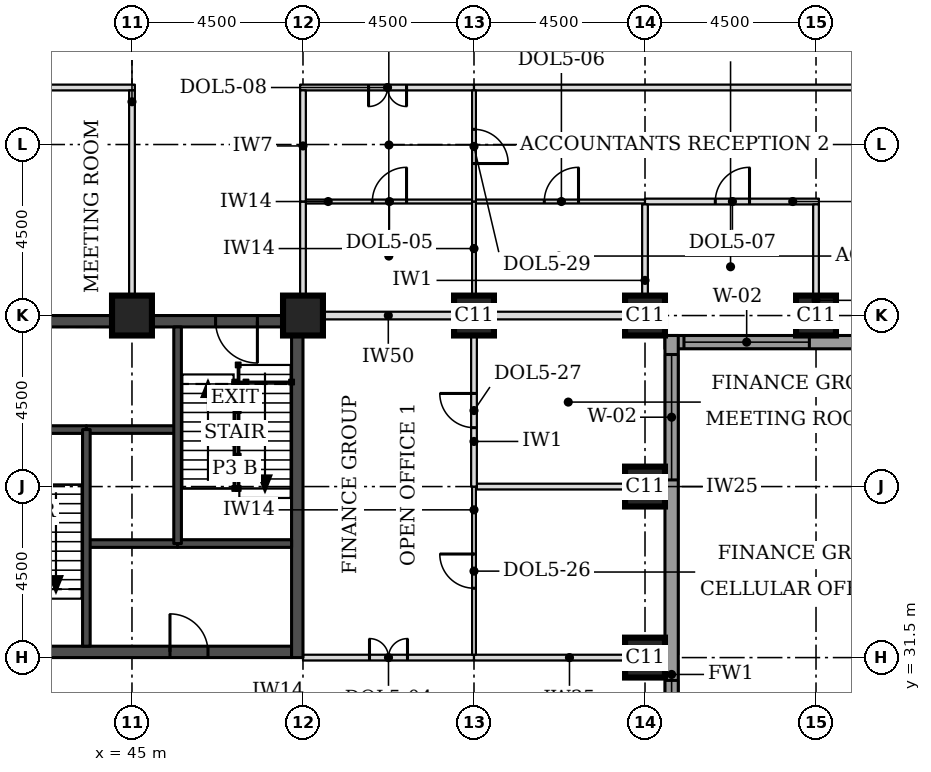
"""IFC4 building model, lengths in metres.
Left out: names, types, materials, properties, quantities, classifications, styles, units other than length and angle.
Written with IfcOpenShell. Run it as: python <this file> out.ifc"""

import sys

from ifc_helpers import new_model, si_unit, direction, frame, frame_2d, origin, origin_2d, place, context, subcontext, project, spatial, rectangle, extrude, element, fill, save


model = new_model("IFC4")
c1 = context("Model", 3, precision=1e-05, world=origin(), true_north=direction((0.0, 1.0)))
c2 = subcontext(c1, "Body", "Model", "MODEL_VIEW")
j1 = project(units=[si_unit("LENGTHUNIT", "METRE"), si_unit("PLANEANGLEUNIT", "RADIAN")], contexts=[c1])
p1 = place(None, origin())
s1 = spatial("IfcSite", under=j1, at=p1, CompositionType="ELEMENT")
p2 = place(p1, origin())
s2 = spatial("IfcBuilding", under=s1, at=p2, CompositionType="ELEMENT")
p3 = place(p2, frame((0.0, 0.0, 112.2)))
s3 = spatial("IfcBuildingStorey", under=s2, at=p3, CompositionType="ELEMENT", Elevation=112.2)
for number, where, z_axis, x_axis in (
    (1, (58.5, 31.5, 0.0), (0.0, 0.0, 1.0), (1.0, 0.0, 0.0)),
    (2, (58.5, 36.0, 0.0), (0.0, 0.0, 1.0), (1.0, 0.0, 0.0)),
    (3, (45.0, 40.5, 0.0), (0.0, 0.0, 1.0), (1.0, 0.0, 0.0)),
    (4, (49.5, 40.5, 0.0), (0.0, 0.0, 1.0), (1.0, 0.0, 0.0)),
    (5, (54.0, 40.5, 0.0), (0.0, 0.0, 1.0), (1.0, 0.0, 0.0)),
    (6, (58.5, 40.5, 0.0), (0.0, 0.0, 1.0), (1.0, 0.0, 0.0)),
    (7, (63.0, 40.5, 0.0), (0.0, 0.0, 1.0), (1.0, 0.0, 0.0)),
):
    element("IfcColumn", number, at=place(p3, frame(where, z_axis=z_axis, x_axis=x_axis)), inside=s3, PredefinedType="COLUMN", context=c2, shape_type="SweptSolid", body=[
        extrude(rectangle(XDim=1.05, YDim=1.05, at=origin_2d()), origin(), (0.0, 0.0, 1.0), 3.7),
    ])
p4 = place(p3, frame((40.8, 31.65, 0.0), z_axis=(0.0, 0.0, 1.0), x_axis=(1.0, 0.0, 0.0)))
e8 = element("IfcWall", 8, at=p4, inside=s3, PredefinedType="SHEAR", context=c2, shape_type="SweptSolid", body=[
    extrude(rectangle(XDim=8.4, YDim=0.3, at=frame_2d((4.2, 0.0))), origin(), (0.0, 0.0, 1.0), 3.7),
])
p5 = place(p4, frame((5.2, 0.0, 0.0)))
e9 = element("IfcOpeningElement", 9, at=p5, cuts=e8, PredefinedType="OPENING", context=c2, shape_type="SweptSolid", body=[
    extrude(rectangle(XDim=1.0, YDim=2.1, at=frame_2d((0.5, 1.05))), frame((0.0, 0.16, 0.0), z_axis=(0.0, -1.0, 0.0), x_axis=(1.0, 0.0, 0.0)), (0.0, 0.0, 1.0), 0.32),
])
p6 = place(p3, frame((40.8, 40.35, 0.0), z_axis=(0.0, 0.0, 1.0), x_axis=(1.0, 0.0, 0.0)))
e10 = element("IfcWall", 10, at=p6, inside=s3, PredefinedType="SHEAR", context=c2, shape_type="SweptSolid", body=[
    extrude(rectangle(XDim=8.4, YDim=0.3, at=frame_2d((4.2, 0.0))), origin(), (0.0, 0.0, 1.0), 3.7),
])
p7 = place(p6, frame((6.4, 0.0, 0.0)))
e11 = element("IfcOpeningElement", 11, at=p7, cuts=e10, PredefinedType="OPENING", context=c2, shape_type="SweptSolid", body=[
    extrude(rectangle(XDim=1.1, YDim=2.1, at=frame_2d((0.55, 1.05))), frame((0.0, 0.16, 0.0), z_axis=(0.0, -1.0, 0.0), x_axis=(1.0, 0.0, 0.0)), (0.0, 0.0, 1.0), 0.32),
])
p8 = place(p3, frame((49.35, 31.5, 0.0), z_axis=(0.0, 0.0, 1.0), x_axis=(0.0, 1.0, 0.0)))
e12 = element("IfcWall", 12, at=p8, inside=s3, PredefinedType="SHEAR", context=c2, shape_type="SweptSolid", body=[
    extrude(rectangle(XDim=9.0, YDim=0.3, at=frame_2d((4.5, 0.0))), origin(), (0.0, 0.0, 1.0), 3.7),
])
p9 = place(p3, frame((59.025, 39.8, 0.0), z_axis=(0.0, 0.0, 1.0), x_axis=(1.0, 0.0, 0.0)))
e13 = element("IfcWall", 13, at=p9, inside=s3, PredefinedType="STANDARD", context=c2, shape_type="SweptSolid", body=[
    extrude(rectangle(XDim=13.337, YDim=0.35, at=frame_2d((6.669, 0.0))), origin(), (0.0, 0.0, 1.0), 3.525),
])
p10 = place(p9, frame((0.5, 0.0, 0.9)))
e14 = element("IfcOpeningElement", 14, at=p10, cuts=e13, PredefinedType="OPENING", context=c2, shape_type="SweptSolid", body=[
    extrude(rectangle(XDim=3.3, YDim=1.9, at=frame_2d((1.65, 0.95))), frame((0.0, 0.185, 0.0), z_axis=(0.0, -1.0, 0.0), x_axis=(1.0, 0.0, 0.0)), (0.0, 0.0, 1.0), 0.37),
])
p11 = place(p3, frame((59.2, 22.138, 0.0), z_axis=(0.0, 0.0, 1.0), x_axis=(0.0, 1.0, 0.0)))
e15 = element("IfcWall", 15, at=p11, inside=s3, PredefinedType="STANDARD", context=c2, shape_type="SweptSolid", body=[
    extrude(rectangle(XDim=17.837, YDim=0.35, at=frame_2d((8.919, 0.0))), origin(), (0.0, 0.0, 1.0), 3.525),
])
p12 = place(p11, frame((5.462, 0.0, 0.9)))
e16 = element("IfcOpeningElement", 16, at=p12, cuts=e15, PredefinedType="OPENING", context=c2, shape_type="SweptSolid", body=[
    extrude(rectangle(XDim=3.3, YDim=1.9, at=frame_2d((1.65, 0.95))), frame((0.0, 0.185, 0.0), z_axis=(0.0, -1.0, 0.0), x_axis=(1.0, 0.0, 0.0)), (0.0, 0.0, 1.0), 0.37),
])
p13 = place(p11, frame((14.037, 0.0, 0.9)))
e17 = element("IfcOpeningElement", 17, at=p13, cuts=e15, PredefinedType="OPENING", context=c2, shape_type="SweptSolid", body=[
    extrude(rectangle(XDim=3.3, YDim=1.9, at=frame_2d((1.65, 0.95))), frame((0.0, 0.185, 0.0), z_axis=(0.0, -1.0, 0.0), x_axis=(1.0, 0.0, 0.0)), (0.0, 0.0, 1.0), 0.37),
])
p14 = place(p3, frame((49.5, 31.5, 0.0), z_axis=(0.0, 0.0, 1.0), x_axis=(1.0, 0.0, 0.0)))
e18 = element("IfcWall", 18, at=p14, inside=s3, PredefinedType="PARTITIONING", context=c2, shape_type="SweptSolid", body=[
    extrude(rectangle(XDim=4.5, YDim=0.15, at=frame_2d((2.25, 0.0))), origin(), (0.0, 0.0, 1.0), 2.55),
])
p15 = place(p14, frame((1.75, 0.0, 0.0)))
e19 = element("IfcOpeningElement", 19, at=p15, cuts=e18, PredefinedType="OPENING", context=c2, shape_type="SweptSolid", body=[
    extrude(rectangle(XDim=1.0, YDim=2.1, at=frame_2d((0.5, 1.05))), frame((0.0, 0.085, 0.0), z_axis=(0.0, -1.0, 0.0), x_axis=(1.0, 0.0, 0.0)), (0.0, 0.0, 1.0), 0.17),
])
p16 = place(p3, frame((54.0, 31.5, 0.0), z_axis=(0.0, 0.0, 1.0), x_axis=(1.0, 0.0, 0.0)))
e20 = element("IfcWall", 20, at=p16, inside=s3, PredefinedType="PARTITIONING", context=c2, shape_type="SweptSolid", body=[
    extrude(rectangle(XDim=5.025, YDim=0.15, at=frame_2d((2.512, 0.0))), origin(), (0.0, 0.0, 1.0), 2.55),
])
p17 = place(p3, frame((54.075, 36.0, 0.0), z_axis=(0.0, 0.0, 1.0), x_axis=(1.0, 0.0, 0.0)))
e21 = element("IfcWall", 21, at=p17, inside=s3, PredefinedType="PARTITIONING", context=c2, shape_type="SweptSolid", body=[
    extrude(rectangle(XDim=4.95, YDim=0.15, at=frame_2d((2.475, 0.0))), origin(), (0.0, 0.0, 1.0), 3.096),
])
p18 = place(p3, frame((50.015, 40.5, 0.0), z_axis=(0.0, 0.0, 1.0), x_axis=(1.0, 0.0, 0.0)))
e22 = element("IfcWall", 22, at=p18, inside=s3, PredefinedType="PARTITIONING", context=c2, shape_type="SweptSolid", body=[
    extrude(rectangle(XDim=3.46, YDim=0.2, at=frame_2d((1.73, 0.0))), origin(), (0.0, 0.0, 1.0), 2.8),
])
p19 = place(p3, frame((54.495, 40.5, 0.0), z_axis=(0.0, 0.0, 1.0), x_axis=(1.0, 0.0, 0.0)))
e23 = element("IfcWall", 23, at=p19, inside=s3, PredefinedType="PARTITIONING", context=c2, shape_type="SweptSolid", body=[
    extrude(rectangle(XDim=3.48, YDim=0.2, at=frame_2d((1.74, 0.0))), origin(), (0.0, 0.0, 1.0), 2.8),
])
p20 = place(p3, frame((49.575, 43.5, 0.0), z_axis=(0.0, 0.0, 1.0), x_axis=(1.0, 0.0, 0.0)))
e24 = element("IfcWall", 24, at=p20, inside=s3, PredefinedType="PARTITIONING", context=c2, shape_type="SweptSolid", body=[
    extrude(rectangle(XDim=4.375, YDim=0.1, at=frame_2d((2.188, 0.0))), origin(), (0.0, 0.0, 1.0), 3.55),
])
p21 = place(p20, frame((1.75, 0.0, 0.0)))
e25 = element("IfcOpeningElement", 25, at=p21, cuts=e24, PredefinedType="OPENING", context=c2, shape_type="SweptSolid", body=[
    extrude(rectangle(XDim=0.9, YDim=2.1, at=frame_2d((0.45, 1.05))), frame((0.0, 0.06, 0.0), z_axis=(0.0, -1.0, 0.0), x_axis=(1.0, 0.0, 0.0)), (0.0, 0.0, 1.0), 0.12),
])
p22 = place(p3, frame((54.05, 43.5, 0.0), z_axis=(0.0, 0.0, 1.0), x_axis=(1.0, 0.0, 0.0)))
e26 = element("IfcWall", 26, at=p22, inside=s3, PredefinedType="PARTITIONING", context=c2, shape_type="SweptSolid", body=[
    extrude(rectangle(XDim=4.45, YDim=0.1, at=frame_2d((2.225, 0.0))), origin(), (0.0, 0.0, 1.0), 3.55),
])
p23 = place(p22, frame((1.8, 0.0, 0.0)))
e27 = element("IfcOpeningElement", 27, at=p23, cuts=e26, PredefinedType="OPENING", context=c2, shape_type="SweptSolid", body=[
    extrude(rectangle(XDim=0.9, YDim=2.1, at=frame_2d((0.45, 1.05))), frame((0.0, 0.06, 0.0), z_axis=(0.0, -1.0, 0.0), x_axis=(1.0, 0.0, 0.0)), (0.0, 0.0, 1.0), 0.12),
])
p24 = place(p3, frame((58.5, 43.5, 0.0), z_axis=(0.0, 0.0, 1.0), x_axis=(1.0, 0.0, 0.0)))
e28 = element("IfcWall", 28, at=p24, inside=s3, PredefinedType="PARTITIONING", context=c2, shape_type="SweptSolid", body=[
    extrude(rectangle(XDim=4.575, YDim=0.15, at=frame_2d((2.288, 0.0))), origin(), (0.0, 0.0, 1.0), 3.55),
])
p25 = place(p24, frame((1.85, 0.0, 0.0)))
e29 = element("IfcOpeningElement", 29, at=p25, cuts=e28, PredefinedType="OPENING", context=c2, shape_type="SweptSolid", body=[
    extrude(rectangle(XDim=0.9, YDim=2.1, at=frame_2d((0.45, 1.05))), frame((0.0, 0.085, 0.0), z_axis=(0.0, -1.0, 0.0), x_axis=(1.0, 0.0, 0.0)), (0.0, 0.0, 1.0), 0.17),
])
p26 = place(p3, frame((40.425, 46.5, 0.0), z_axis=(0.0, 0.0, 1.0), x_axis=(1.0, 0.0, 0.0)))
e30 = element("IfcWall", 30, at=p26, inside=s3, PredefinedType="PARTITIONING", context=c2, shape_type="SweptSolid", body=[
    extrude(rectangle(XDim=4.65, YDim=0.15, at=frame_2d((2.325, 0.0))), origin(), (0.0, 0.0, 1.0), 3.55),
])
p27 = place(p3, frame((49.425, 46.5, 0.0), z_axis=(0.0, 0.0, 1.0), x_axis=(1.0, 0.0, 0.0)))
e31 = element("IfcWall", 31, at=p27, inside=s3, PredefinedType="PARTITIONING", context=c2, shape_type="SweptSolid", body=[
    extrude(rectangle(XDim=4.575, YDim=0.15, at=frame_2d((2.288, 0.0))), origin(), (0.0, 0.0, 1.0), 3.55),
])
p28 = place(p27, frame((1.8, 0.0, 0.0)))
e32 = element("IfcOpeningElement", 32, at=p28, cuts=e31, PredefinedType="OPENING", context=c2, shape_type="SweptSolid", body=[
    extrude(rectangle(XDim=1.0, YDim=2.1, at=frame_2d((0.5, 1.05))), frame((0.0, 0.085, 0.0), z_axis=(0.0, -1.0, 0.0), x_axis=(1.0, 0.0, 0.0)), (0.0, 0.0, 1.0), 0.17),
])
p29 = place(p3, frame((54.0, 46.5, 0.0), z_axis=(0.0, 0.0, 1.0), x_axis=(1.0, 0.0, 0.0)))
e33 = element("IfcWall", 33, at=p29, inside=s3, PredefinedType="PARTITIONING", context=c2, shape_type="SweptSolid", body=[
    extrude(rectangle(XDim=16.5, YDim=0.15, at=frame_2d((8.25, 0.0))), origin(), (0.0, 0.0, 1.0), 3.55),
])
p30 = place(p3, frame((54.0, 31.575, 0.0), z_axis=(0.0, 0.0, 1.0), x_axis=(0.0, 1.0, 0.0)))
e34 = element("IfcWall", 34, at=p30, inside=s3, PredefinedType="PARTITIONING", context=c2, shape_type="SweptSolid", body=[
    extrude(rectangle(XDim=4.425, YDim=0.1, at=frame_2d((2.212, 0.0))), origin(), (0.0, 0.0, 1.0), 3.55),
])
p31 = place(p30, frame((1.75, 0.0, 0.0)))
e35 = element("IfcOpeningElement", 35, at=p31, cuts=e34, PredefinedType="OPENING", context=c2, shape_type="SweptSolid", body=[
    extrude(rectangle(XDim=0.9, YDim=2.1, at=frame_2d((0.45, 1.05))), frame((0.0, 0.06, 0.0), z_axis=(0.0, -1.0, 0.0), x_axis=(1.0, 0.0, 0.0)), (0.0, 0.0, 1.0), 0.12),
])
p32 = place(p3, frame((54.0, 36.0, 0.0), z_axis=(0.0, 0.0, 1.0), x_axis=(0.0, 1.0, 0.0)))
e36 = element("IfcWall", 36, at=p32, inside=s3, PredefinedType="PARTITIONING", context=c2, shape_type="SweptSolid", body=[
    extrude(rectangle(XDim=3.975, YDim=0.15, at=frame_2d((1.988, 0.0))), origin(), (0.0, 0.0, 1.0), 3.55),
])
p33 = place(p32, frame((1.55, 0.0, 0.0)))
e37 = element("IfcOpeningElement", 37, at=p33, cuts=e36, PredefinedType="OPENING", context=c2, shape_type="SweptSolid", body=[
    extrude(rectangle(XDim=0.9, YDim=2.1, at=frame_2d((0.45, 1.05))), frame((0.0, 0.085, 0.0), z_axis=(0.0, -1.0, 0.0), x_axis=(1.0, 0.0, 0.0)), (0.0, 0.0, 1.0), 0.17),
])
p34 = place(p3, frame((63.0, 39.975, 0.0), z_axis=(0.0, 0.0, 1.0), x_axis=(0.0, 1.0, 0.0)))
e38 = element("IfcWall", 38, at=p34, inside=s3, PredefinedType="PARTITIONING", context=c2, shape_type="SweptSolid", body=[
    extrude(rectangle(XDim=3.45, YDim=0.15, at=frame_2d((1.725, 0.0))), origin(), (0.0, 0.0, 1.0), 3.55),
])
p35 = place(p3, frame((45.0, 41.025, 0.0), z_axis=(0.0, 0.0, 1.0), x_axis=(0.0, 1.0, 0.0)))
e39 = element("IfcWall", 39, at=p35, inside=s3, PredefinedType="PARTITIONING", context=c2, shape_type="SweptSolid", body=[
    extrude(rectangle(XDim=5.4, YDim=0.15, at=frame_2d((2.7, 0.0))), origin(), (0.0, 0.0, 1.0), 3.55),
])
p36 = place(p3, frame((49.5, 41.025, 0.0), z_axis=(0.0, 0.0, 1.0), x_axis=(0.0, 1.0, 0.0)))
e40 = element("IfcWall", 40, at=p36, inside=s3, PredefinedType="PARTITIONING", context=c2, shape_type="SweptSolid", body=[
    extrude(rectangle(XDim=2.475, YDim=0.15, at=frame_2d((1.238, 0.0))), origin(), (0.0, 0.0, 1.0), 3.55),
])
p37 = place(p3, frame((54.0, 41.025, 0.0), z_axis=(0.0, 0.0, 1.0), x_axis=(0.0, 1.0, 0.0)))
e41 = element("IfcWall", 41, at=p37, inside=s3, PredefinedType="PARTITIONING", context=c2, shape_type="SweptSolid", body=[
    extrude(rectangle(XDim=2.475, YDim=0.1, at=frame_2d((1.238, 0.0))), origin(), (0.0, 0.0, 1.0), 3.55),
])
p38 = place(p3, frame((58.5, 41.025, 0.0), z_axis=(0.0, 0.0, 1.0), x_axis=(0.0, 1.0, 0.0)))
e42 = element("IfcWall", 42, at=p38, inside=s3, PredefinedType="PARTITIONING", context=c2, shape_type="SweptSolid", body=[
    extrude(rectangle(XDim=2.4, YDim=0.15, at=frame_2d((1.2, 0.0))), origin(), (0.0, 0.0, 1.0), 3.55),
])
p39 = place(p3, frame((49.5, 43.5, 0.0), z_axis=(0.0, 0.0, 1.0), x_axis=(0.0, 1.0, 0.0)))
e43 = element("IfcWall", 43, at=p39, inside=s3, PredefinedType="PARTITIONING", context=c2, shape_type="SweptSolid", body=[
    extrude(rectangle(XDim=2.925, YDim=0.15, at=frame_2d((1.462, 0.0))), origin(), (0.0, 0.0, 1.0), 3.55),
])
p40 = place(p3, frame((54.0, 43.5, 0.0), z_axis=(0.0, 0.0, 1.0), x_axis=(0.0, 1.0, 0.0)))
e44 = element("IfcWall", 44, at=p40, inside=s3, PredefinedType="PARTITIONING", context=c2, shape_type="SweptSolid", body=[
    extrude(rectangle(XDim=2.925, YDim=0.1, at=frame_2d((1.462, 0.0))), origin(), (0.0, 0.0, 1.0), 3.55),
])
p41 = place(p40, frame((1.0, 0.0, 0.0)))
e45 = element("IfcOpeningElement", 45, at=p41, cuts=e44, PredefinedType="OPENING", context=c2, shape_type="SweptSolid", body=[
    extrude(rectangle(XDim=0.9, YDim=2.1, at=frame_2d((0.45, 1.05))), frame((0.0, 0.06, 0.0), z_axis=(0.0, -1.0, 0.0), x_axis=(1.0, 0.0, 0.0)), (0.0, 0.0, 1.0), 0.12),
])
p42 = place(p3, frame((43.8, 34.5, 0.0), z_axis=(0.0, 0.0, 1.0), x_axis=(1.0, 0.0, 0.0)))
e46 = element("IfcWall", 46, at=p42, inside=s3, PredefinedType="SOLIDWALL", context=c2, shape_type="SweptSolid", body=[
    extrude(rectangle(XDim=2.4, YDim=0.2, at=frame_2d((1.2, 0.0))), origin(), (0.0, 0.0, 1.0), 3.55),
])
p43 = place(p3, frame((46.2, 34.5, 0.0), z_axis=(0.0, 0.0, 1.0), x_axis=(1.0, 0.0, 0.0)))
e47 = element("IfcWall", 47, at=p43, inside=s3, PredefinedType="SOLIDWALL", context=c2, shape_type="SweptSolid", body=[
    extrude(rectangle(XDim=3.0, YDim=0.2, at=frame_2d((1.5, 0.0))), origin(), (0.0, 0.0, 1.0), 3.55),
])
p44 = place(p3, frame((43.8, 37.5, 0.0), z_axis=(0.0, 0.0, 1.0), x_axis=(1.0, 0.0, 0.0)))
e48 = element("IfcWall", 48, at=p44, inside=s3, PredefinedType="SOLIDWALL", context=c2, shape_type="SweptSolid", body=[
    extrude(rectangle(XDim=2.4, YDim=0.2, at=frame_2d((1.2, 0.0))), origin(), (0.0, 0.0, 1.0), 3.7),
])
p45 = place(p3, frame((40.8, 37.5, 0.0), z_axis=(0.0, 0.0, 1.0), x_axis=(1.0, 0.0, 0.0)))
e49 = element("IfcWall", 49, at=p45, inside=s3, PredefinedType="SOLIDWALL", context=c2, shape_type="SweptSolid", body=[
    extrude(rectangle(XDim=3.0, YDim=0.2, at=frame_2d((1.5, 0.0))), origin(), (0.0, 0.0, 1.0), 3.55),
])
for number, where, z_axis, x_axis in (
    (50, (43.8, 31.8, 0.0), (0.0, 0.0, 1.0), (0.0, 1.0, 0.0)),
    (51, (46.2, 34.5, 0.0), (0.0, 0.0, 1.0), (0.0, 1.0, 0.0)),
):
    element("IfcWall", number, at=place(p3, frame(where, z_axis=z_axis, x_axis=x_axis)), inside=s3, PredefinedType="SOLIDWALL", context=c2, shape_type="SweptSolid", body=[
        extrude(rectangle(XDim=5.7, YDim=0.2, at=frame_2d((2.85, 0.0))), origin(), (0.0, 0.0, 1.0), 3.55),
    ])
p46 = place(p10, origin())
e52 = element("IfcWindow", 52, at=p46, inside=s3, PartitioningType="SINGLE_PANEL", PredefinedType="WINDOW", context=c2, shape_type="SweptSolid", body=[
    extrude(rectangle(XDim=3.3, YDim=1.9, at=frame_2d((1.65, 0.95))), frame((0.0, 0.085, 0.0), z_axis=(0.0, -1.0, 0.0), x_axis=(1.0, 0.0, 0.0)), (0.0, 0.0, 1.0), 0.06),
])
fill(e14, e52)
p47 = place(p12, origin())
e53 = element("IfcWindow", 53, at=p47, inside=s3, PartitioningType="SINGLE_PANEL", PredefinedType="WINDOW", context=c2, shape_type="SweptSolid", body=[
    extrude(rectangle(XDim=3.3, YDim=1.9, at=frame_2d((1.65, 0.95))), frame((0.0, 0.085, 0.0), z_axis=(0.0, -1.0, 0.0), x_axis=(1.0, 0.0, 0.0)), (0.0, 0.0, 1.0), 0.06),
])
fill(e16, e53)
p48 = place(p13, origin())
e54 = element("IfcWindow", 54, at=p48, inside=s3, PartitioningType="SINGLE_PANEL", PredefinedType="WINDOW", context=c2, shape_type="SweptSolid", body=[
    extrude(rectangle(XDim=3.3, YDim=1.9, at=frame_2d((1.65, 0.95))), frame((0.0, 0.085, 0.0), z_axis=(0.0, -1.0, 0.0), x_axis=(1.0, 0.0, 0.0)), (0.0, 0.0, 1.0), 0.06),
])
fill(e17, e54)
p49 = place(p15, origin())
e55 = element("IfcDoor", 55, at=p49, inside=s3, OperationType="DOUBLE_DOOR_SINGLE_SWING", PredefinedType="DOOR", context=c2, shape_type="SweptSolid", body=[
    extrude(rectangle(XDim=1.0, YDim=2.1, at=frame_2d((0.5, 1.05))), frame((0.0, 0.025, 0.0), z_axis=(0.0, -1.0, 0.0), x_axis=(1.0, 0.0, 0.0)), (0.0, 0.0, 1.0), 0.05),
])
fill(e19, e55)
p50 = place(p31, origin())
e56 = element("IfcDoor", 56, at=p50, inside=s3, OperationType="SINGLE_SWING_RIGHT", PredefinedType="DOOR", context=c2, shape_type="SweptSolid", body=[
    extrude(rectangle(XDim=0.9, YDim=2.1, at=frame_2d((0.45, 1.05))), frame((0.0, 0.025, 0.0), z_axis=(0.0, -1.0, 0.0), x_axis=(1.0, 0.0, 0.0)), (0.0, 0.0, 1.0), 0.05),
])
fill(e35, e56)
p51 = place(p33, origin())
e57 = element("IfcDoor", 57, at=p51, inside=s3, OperationType="SINGLE_SWING_RIGHT", PredefinedType="DOOR", context=c2, shape_type="SweptSolid", body=[
    extrude(rectangle(XDim=0.9, YDim=2.1, at=frame_2d((0.45, 1.05))), frame((0.0, 0.025, 0.0), z_axis=(0.0, -1.0, 0.0), x_axis=(1.0, 0.0, 0.0)), (0.0, 0.0, 1.0), 0.05),
])
fill(e37, e57)
p52 = place(p28, frame((1.0, 0.0, 0.0), z_axis=(0.0, 0.0, 1.0), x_axis=(-1.0, 0.0, 0.0)))
e58 = element("IfcDoor", 58, at=p52, inside=s3, OperationType="DOUBLE_DOOR_SINGLE_SWING", PredefinedType="DOOR", context=c2, shape_type="SweptSolid", body=[
    extrude(rectangle(XDim=1.0, YDim=2.1, at=frame_2d((0.5, 1.05))), frame((0.0, 0.025, 0.0), z_axis=(0.0, -1.0, 0.0), x_axis=(1.0, 0.0, 0.0)), (0.0, 0.0, 1.0), 0.05),
])
fill(e32, e58)
p53 = place(p41, frame((0.9, 0.0, 0.0), z_axis=(0.0, 0.0, 1.0), x_axis=(-1.0, 0.0, 0.0)))
e59 = element("IfcDoor", 59, at=p53, inside=s3, OperationType="SINGLE_SWING_RIGHT", PredefinedType="DOOR", context=c2, shape_type="SweptSolid", body=[
    extrude(rectangle(XDim=0.9, YDim=2.1, at=frame_2d((0.45, 1.05))), frame((0.0, 0.025, 0.0), z_axis=(0.0, -1.0, 0.0), x_axis=(1.0, 0.0, 0.0)), (0.0, 0.0, 1.0), 0.05),
])
fill(e45, e59)
p54 = place(p21, origin())
e60 = element("IfcDoor", 60, at=p54, inside=s3, OperationType="SINGLE_SWING_RIGHT", PredefinedType="DOOR", context=c2, shape_type="SweptSolid", body=[
    extrude(rectangle(XDim=0.9, YDim=2.1, at=frame_2d((0.45, 1.05))), frame((0.0, 0.025, 0.0), z_axis=(0.0, -1.0, 0.0), x_axis=(1.0, 0.0, 0.0)), (0.0, 0.0, 1.0), 0.05),
])
fill(e25, e60)
p55 = place(p23, origin())
e61 = element("IfcDoor", 61, at=p55, inside=s3, OperationType="SINGLE_SWING_RIGHT", PredefinedType="DOOR", context=c2, shape_type="SweptSolid", body=[
    extrude(rectangle(XDim=0.9, YDim=2.1, at=frame_2d((0.45, 1.05))), frame((0.0, 0.025, 0.0), z_axis=(0.0, -1.0, 0.0), x_axis=(1.0, 0.0, 0.0)), (0.0, 0.0, 1.0), 0.05),
])
fill(e27, e61)
p56 = place(p25, origin())
e62 = element("IfcDoor", 62, at=p56, inside=s3, OperationType="SINGLE_SWING_RIGHT", PredefinedType="DOOR", context=c2, shape_type="SweptSolid", body=[
    extrude(rectangle(XDim=0.9, YDim=2.1, at=frame_2d((0.45, 1.05))), frame((0.0, 0.025, 0.0), z_axis=(0.0, -1.0, 0.0), x_axis=(1.0, 0.0, 0.0)), (0.0, 0.0, 1.0), 0.05),
])
fill(e29, e62)
p57 = place(p7, frame((1.1, 0.0, 0.0), z_axis=(0.0, 0.0, 1.0), x_axis=(-1.0, 0.0, 0.0)))
e63 = element("IfcDoor", 63, at=p57, inside=s3, OperationType="SINGLE_SWING_LEFT", PredefinedType="DOOR", context=c2, shape_type="SweptSolid", body=[
    extrude(rectangle(XDim=1.1, YDim=2.1, at=frame_2d((0.55, 1.05))), frame((0.0, 0.025, 0.0), z_axis=(0.0, -1.0, 0.0), x_axis=(1.0, 0.0, 0.0)), (0.0, 0.0, 1.0), 0.05),
])
fill(e11, e63)
p58 = place(p5, origin())
e64 = element("IfcDoor", 64, at=p58, inside=s3, OperationType="SINGLE_SWING_LEFT", PredefinedType="DOOR", context=c2, shape_type="SweptSolid", body=[
    extrude(rectangle(XDim=1.0, YDim=2.1, at=frame_2d((0.5, 1.05))), frame((0.0, 0.025, 0.0), z_axis=(0.0, -1.0, 0.0), x_axis=(1.0, 0.0, 0.0)), (0.0, 0.0, 1.0), 0.05),
])
fill(e9, e64)
save(model, sys.argv[1])
